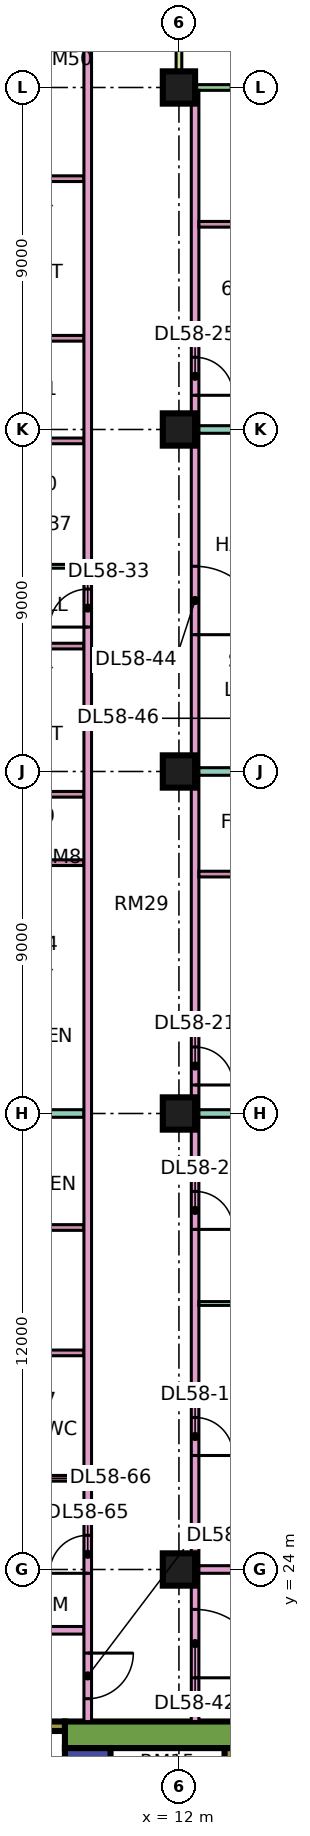
"""IFC4 building model, lengths in metres.
Left out: names, types, materials, properties, quantities, classifications, styles, units other than length and angle.
Written with IfcOpenShell. Run it as: python <this file> out.ifc"""

import sys

from ifc_helpers import new_model, si_unit, direction, frame, frame_2d, origin, origin_2d, place, context, subcontext, project, spatial, rectangle, extrude, element, fill, save


model = new_model("IFC4")
c1 = context("Model", 3, precision=1e-05, world=origin(), true_north=direction((0.0, 1.0)))
c2 = subcontext(c1, "Body", "Model", "MODEL_VIEW")
j1 = project(units=[si_unit("LENGTHUNIT", "METRE"), si_unit("PLANEANGLEUNIT", "RADIAN")], contexts=[c1])
p1 = place(None, origin())
s1 = spatial("IfcSite", under=j1, at=p1, CompositionType="ELEMENT")
p2 = place(p1, origin())
s2 = spatial("IfcBuilding", under=s1, at=p2, CompositionType="ELEMENT")
p3 = place(p2, frame((0.0, 0.0, 245.4)))
s3 = spatial("IfcBuildingStorey", under=s2, at=p3, CompositionType="ELEMENT", Elevation=245.4)
for number, where, z_axis, x_axis in (
    (1, (12.0, 24.0, 0.0), (0.0, 0.0, 1.0), (1.0, 0.0, 0.0)),
    (2, (12.0, 36.0, 0.0), (0.0, 0.0, 1.0), (1.0, 0.0, 0.0)),
    (3, (12.0, 45.0, 0.0), (0.0, 0.0, 1.0), (1.0, 0.0, 0.0)),
    (4, (12.0, 54.0, 0.0), (0.0, 0.0, 1.0), (1.0, 0.0, 0.0)),
    (5, (12.0, 63.0, 0.0), (0.0, 0.0, 1.0), (1.0, 0.0, 0.0)),
):
    element("IfcColumn", number, at=place(p3, frame(where, z_axis=z_axis, x_axis=x_axis)), inside=s3, PredefinedType="COLUMN", context=c2, shape_type="SweptSolid", body=[
        extrude(rectangle(XDim=0.85, YDim=0.85, at=origin_2d()), origin(), (0.0, 0.0, 1.0), 3.75),
    ])
p4 = place(p3, frame((9.0, 19.65, 0.0), z_axis=(0.0, 0.0, 1.0), x_axis=(1.0, 0.0, 0.0)))
e6 = element("IfcWall", 6, at=p4, inside=s3, PredefinedType="SHEAR", context=c2, shape_type="SweptSolid", body=[
    extrude(rectangle(XDim=25.0, YDim=0.7, at=frame_2d((12.5, 0.0))), origin(), (0.0, 0.0, 1.0), 3.75),
])
p5 = place(p4, frame((19.1, 0.0, 0.0)))
e7 = element("IfcOpeningElement", 7, at=p5, cuts=e6, PredefinedType="OPENING", context=c2, shape_type="SweptSolid", body=[
    extrude(rectangle(XDim=1.8, YDim=2.4, at=frame_2d((0.9, 1.2))), frame((0.0, 0.36, 0.0), z_axis=(0.0, -1.0, 0.0), x_axis=(1.0, 0.0, 0.0)), (0.0, 0.0, 1.0), 0.72),
])
p6 = place(p3, frame((9.6, 7.7, 0.0), z_axis=(0.0, 0.0, 1.0), x_axis=(0.0, 1.0, 0.0)))
e8 = element("IfcWall", 8, at=p6, inside=s3, PredefinedType="SHEAR", context=c2, shape_type="SweptSolid", body=[
    extrude(rectangle(XDim=11.6, YDim=1.2, at=frame_2d((5.8, 0.0))), origin(), (0.0, 0.0, 1.0), 3.75),
])
p7 = place(p6, frame((4.175, 0.0, 0.0)))
e9 = element("IfcOpeningElement", 9, at=p7, cuts=e8, PredefinedType="OPENING", context=c2, shape_type="SweptSolid", body=[
    extrude(rectangle(XDim=1.1, YDim=2.2, at=frame_2d((0.55, 1.1))), frame((0.0, 0.61, 0.0), z_axis=(0.0, -1.0, 0.0), x_axis=(1.0, 0.0, 0.0)), (0.0, 0.0, 1.0), 1.22),
])
p8 = place(p6, frame((6.675, 0.0, 0.0)))
e10 = element("IfcOpeningElement", 10, at=p8, cuts=e8, PredefinedType="OPENING", context=c2, shape_type="SweptSolid", body=[
    extrude(rectangle(XDim=1.1, YDim=2.2, at=frame_2d((0.55, 1.1))), frame((0.0, 0.61, 0.0), z_axis=(0.0, -1.0, 0.0), x_axis=(1.0, 0.0, 0.0)), (0.0, 0.0, 1.0), 1.22),
])
p9 = place(p6, frame((9.55, 0.0, 0.0)))
e11 = element("IfcOpeningElement", 11, at=p9, cuts=e8, PredefinedType="OPENING", context=c2, shape_type="SweptSolid", body=[
    extrude(rectangle(XDim=1.1, YDim=2.2, at=frame_2d((0.55, 1.1))), frame((0.0, 0.61, 0.0), z_axis=(0.0, -1.0, 0.0), x_axis=(1.0, 0.0, 0.0)), (0.0, 0.0, 1.0), 1.22),
])
p10 = place(p6, frame((1.85, 0.0, 0.0)))
e12 = element("IfcOpeningElement", 12, at=p10, cuts=e8, PredefinedType="OPENING", context=c2, shape_type="SweptSolid", body=[
    extrude(rectangle(XDim=0.9, YDim=2.1, at=frame_2d((0.45, 1.05))), frame((0.0, 0.61, 0.0), z_axis=(0.0, -1.0, 0.0), x_axis=(1.0, 0.0, 0.0)), (0.0, 0.0, 1.0), 1.22),
])
p11 = place(p3, frame((13.325, 7.7, 0.0), z_axis=(0.0, 0.0, 1.0), x_axis=(0.0, 1.0, 0.0)))
e13 = element("IfcWall", 13, at=p11, inside=s3, PredefinedType="SHEAR", context=c2, shape_type="SweptSolid", body=[
    extrude(rectangle(XDim=11.6, YDim=0.25, at=frame_2d((5.8, 0.0))), origin(), (0.0, 0.0, 1.0), 3.75),
])
p12 = place(p3, frame((2.1, 19.875, 0.0), z_axis=(0.0, 0.0, 1.0), x_axis=(1.0, 0.0, 0.0)))
e14 = element("IfcWall", 14, at=p12, inside=s3, PredefinedType="SHEAR", context=c2, shape_type="SweptSolid", body=[
    extrude(rectangle(XDim=6.9, YDim=0.25, at=frame_2d((3.45, 0.0))), origin(), (0.0, 0.0, 1.0), 3.75),
])
p13 = place(p12, frame((1.175, 0.0, 0.0)))
e15 = element("IfcOpeningElement", 15, at=p13, cuts=e14, PredefinedType="OPENING", context=c2, shape_type="SweptSolid", body=[
    extrude(rectangle(XDim=1.1, YDim=2.2, at=frame_2d((0.55, 1.1))), frame((0.0, 0.135, 0.0), z_axis=(0.0, -1.0, 0.0), x_axis=(1.0, 0.0, 0.0)), (0.0, 0.0, 1.0), 0.27),
])
p14 = place(p12, frame((4.6, 0.0, 0.0)))
e16 = element("IfcOpeningElement", 16, at=p14, cuts=e14, PredefinedType="OPENING", context=c2, shape_type="SweptSolid", body=[
    extrude(rectangle(XDim=1.2, YDim=2.2, at=frame_2d((0.6, 1.1))), frame((0.0, 0.135, 0.0), z_axis=(0.0, -1.0, 0.0), x_axis=(1.0, 0.0, 0.0)), (0.0, 0.0, 1.0), 0.27),
])
p15 = place(p3, frame((22.425, 63.0, 0.0), z_axis=(0.0, 0.0, 1.0), x_axis=(-1.0, 0.0, 0.0)))
e17 = element("IfcWall", 17, at=p15, inside=s3, PredefinedType="SOLIDWALL", context=c2, shape_type="SweptSolid", body=[
    extrude(rectangle(XDim=10.35, YDim=0.15, at=frame_2d((5.175, 0.0))), origin(), (0.0, 0.0, 1.0), 3.35),
])
p16 = place(p15, frame((1.7, 0.0, 0.0)))
e18 = element("IfcOpeningElement", 18, at=p16, cuts=e17, PredefinedType="OPENING", context=c2, shape_type="SweptSolid", body=[
    extrude(rectangle(XDim=1.8, YDim=2.4, at=frame_2d((0.9, 1.2))), frame((0.0, 0.085, 0.0), z_axis=(0.0, -1.0, 0.0), x_axis=(1.0, 0.0, 0.0)), (0.0, 0.0, 1.0), 0.17),
])
p17 = place(p15, frame((6.05, 0.0, 0.45)))
e19 = element("IfcOpeningElement", 19, at=p17, cuts=e17, PredefinedType="OPENING", context=c2, shape_type="SweptSolid", body=[
    extrude(rectangle(XDim=3.0, YDim=2.4, at=frame_2d((1.5, 1.2))), frame((0.0, 0.085, 0.0), z_axis=(0.0, -1.0, 0.0), x_axis=(1.0, 0.0, 0.0)), (0.0, 0.0, 1.0), 0.17),
])
p18 = place(p3, frame((12.0, 64.5, 0.0), z_axis=(0.0, 0.0, 1.0), x_axis=(0.0, -1.0, 0.0)))
e20 = element("IfcWall", 20, at=p18, inside=s3, PredefinedType="SOLIDWALL", context=c2, shape_type="SweptSolid", body=[
    extrude(rectangle(XDim=1.5, YDim=0.15, at=frame_2d((0.75, 0.0))), origin(), (0.0, 0.0, 1.0), 3.35),
])
p19 = place(p3, frame((0.074, 22.4, 0.0), z_axis=(0.0, 0.0, 1.0), x_axis=(1.0, 0.0, 0.0)))
e21 = element("IfcWall", 21, at=p19, inside=s3, PredefinedType="PARTITIONING", context=c2, shape_type="SweptSolid", body=[
    extrude(rectangle(XDim=9.426, YDim=0.2, at=frame_2d((4.713, 0.0))), origin(), (0.0, 0.0, 1.0), 3.35),
])
p20 = place(p3, frame((6.375, 26.4, 0.0), z_axis=(0.0, 0.0, 1.0), x_axis=(1.0, 0.0, 0.0)))
e22 = element("IfcWall", 22, at=p20, inside=s3, PredefinedType="PARTITIONING", context=c2, shape_type="SweptSolid", body=[
    extrude(rectangle(XDim=3.125, YDim=0.15, at=frame_2d((1.562, 0.0))), origin(), (0.0, 0.0, 1.0), 3.35),
])
p21 = place(p20, frame((1.225, 0.0, 0.0)))
e23 = element("IfcOpeningElement", 23, at=p21, cuts=e22, PredefinedType="OPENING", context=c2, shape_type="SweptSolid", body=[
    extrude(rectangle(XDim=0.8, YDim=2.1, at=frame_2d((0.4, 1.05))), frame((0.0, 0.085, 0.0), z_axis=(0.0, -1.0, 0.0), x_axis=(1.0, 0.0, 0.0)), (0.0, 0.0, 1.0), 0.17),
])
for number, where, z_axis, x_axis in (
    (24, (6.375, 29.7, 0.0), (0.0, 0.0, 1.0), (1.0, 0.0, 0.0)),
    (25, (6.375, 33.0, 0.0), (0.0, 0.0, 1.0), (1.0, 0.0, 0.0)),
):
    element("IfcWall", number, at=place(p3, frame(where, z_axis=z_axis, x_axis=x_axis)), inside=s3, PredefinedType="PARTITIONING", context=c2, shape_type="SweptSolid", body=[
        extrude(rectangle(XDim=3.125, YDim=0.15, at=frame_2d((1.562, 0.0))), origin(), (0.0, 0.0, 1.0), 3.35),
    ])
p22 = place(p3, frame((6.525, 36.0, 0.0), z_axis=(0.0, 0.0, 1.0), x_axis=(1.0, 0.0, 0.0)))
e26 = element("IfcWall", 26, at=p22, inside=s3, PredefinedType="PARTITIONING", context=c2, shape_type="SweptSolid", body=[
    extrude(rectangle(XDim=2.975, YDim=0.2, at=frame_2d((1.488, 0.0))), origin(), (0.0, 0.0, 1.0), 3.35),
])
for number, where, z_axis, x_axis in (
    (27, (6.675, 42.6, 0.0), (0.0, 0.0, 1.0), (1.0, 0.0, 0.0)),
    (28, (6.675, 44.4, 0.0), (0.0, 0.0, 1.0), (1.0, 0.0, 0.0)),
    (29, (6.675, 48.3, 0.0), (0.0, 0.0, 1.0), (1.0, 0.0, 0.0)),
):
    element("IfcWall", number, at=place(p3, frame(where, z_axis=z_axis, x_axis=x_axis)), inside=s3, PredefinedType="PARTITIONING", context=c2, shape_type="SweptSolid", body=[
        extrude(rectangle(XDim=2.825, YDim=0.15, at=frame_2d((1.413, 0.0))), origin(), (0.0, 0.0, 1.0), 3.35),
    ])
p23 = place(p3, frame((6.675, 50.4, 0.0), z_axis=(0.0, 0.0, 1.0), x_axis=(1.0, 0.0, 0.0)))
e30 = element("IfcWall", 30, at=p23, inside=s3, PredefinedType="PARTITIONING", context=c2, shape_type="SweptSolid", body=[
    extrude(rectangle(XDim=2.825, YDim=0.1, at=frame_2d((1.413, 0.0))), origin(), (0.0, 0.0, 1.0), 3.35),
])
p24 = place(p23, frame((0.975, 0.0, 0.0)))
e31 = element("IfcOpeningElement", 31, at=p24, cuts=e30, PredefinedType="OPENING", context=c2, shape_type="SweptSolid", body=[
    extrude(rectangle(XDim=0.9, YDim=2.1, at=frame_2d((0.45, 1.05))), frame((0.0, 0.06, 0.0), z_axis=(0.0, -1.0, 0.0), x_axis=(1.0, 0.0, 0.0)), (0.0, 0.0, 1.0), 0.12),
])
for number, where, z_axis, x_axis in (
    (32, (6.675, 53.7, 0.0), (0.0, 0.0, 1.0), (1.0, 0.0, 0.0)),
    (33, (6.675, 56.4, 0.0), (0.0, 0.0, 1.0), (1.0, 0.0, 0.0)),
    (34, (6.675, 60.6, 0.0), (0.0, 0.0, 1.0), (1.0, 0.0, 0.0)),
):
    element("IfcWall", number, at=place(p3, frame(where, z_axis=z_axis, x_axis=x_axis)), inside=s3, PredefinedType="PARTITIONING", context=c2, shape_type="SweptSolid", body=[
        extrude(rectangle(XDim=2.825, YDim=0.15, at=frame_2d((1.413, 0.0))), origin(), (0.0, 0.0, 1.0), 3.35),
    ])
p25 = place(p3, frame((9.6, 20.0, 0.0), z_axis=(0.0, 0.0, 1.0), x_axis=(0.0, 1.0, 0.0)))
e35 = element("IfcWall", 35, at=p25, inside=s3, PredefinedType="PARTITIONING", context=c2, shape_type="SweptSolid", body=[
    extrude(rectangle(XDim=44.35, YDim=0.2, at=frame_2d((22.175, 0.0))), origin(), (0.0, 0.0, 1.0), 3.35),
])
p26 = place(p25, frame((28.8, 0.0, 0.0)))
e36 = element("IfcOpeningElement", 36, at=p26, cuts=e35, PredefinedType="OPENING", context=c2, shape_type="SweptSolid", body=[
    extrude(rectangle(XDim=1.0, YDim=2.1, at=frame_2d((0.5, 1.05))), frame((0.0, 0.11, 0.0), z_axis=(0.0, -1.0, 0.0), x_axis=(1.0, 0.0, 0.0)), (0.0, 0.0, 1.0), 0.22),
])
p27 = place(p25, frame((0.6, 0.0, 0.0)))
e37 = element("IfcOpeningElement", 37, at=p27, cuts=e35, PredefinedType="OPENING", context=c2, shape_type="SweptSolid", body=[
    extrude(rectangle(XDim=1.2, YDim=2.1, at=frame_2d((0.6, 1.05))), frame((0.0, 0.11, 0.0), z_axis=(0.0, -1.0, 0.0), x_axis=(1.0, 0.0, 0.0)), (0.0, 0.0, 1.0), 0.22),
])
p28 = place(p25, frame((3.9, 0.0, 0.0)))
e38 = element("IfcOpeningElement", 38, at=p28, cuts=e35, PredefinedType="OPENING", context=c2, shape_type="SweptSolid", body=[
    extrude(rectangle(XDim=1.0, YDim=2.1, at=frame_2d((0.5, 1.05))), frame((0.0, 0.11, 0.0), z_axis=(0.0, -1.0, 0.0), x_axis=(1.0, 0.0, 0.0)), (0.0, 0.0, 1.0), 0.22),
])
p29 = place(p3, frame((12.425, 20.0, 0.0), z_axis=(0.0, 0.0, 1.0), x_axis=(0.0, 1.0, 0.0)))
e39 = element("IfcWall", 39, at=p29, inside=s3, PredefinedType="PARTITIONING", context=c2, shape_type="SweptSolid", body=[
    extrude(rectangle(XDim=42.926, YDim=0.2, at=frame_2d((21.463, 0.0))), origin(), (0.0, 0.0, 1.0), 3.35),
])
p30 = place(p29, frame((7.0, 0.0, 0.0)))
e40 = element("IfcOpeningElement", 40, at=p30, cuts=e39, PredefinedType="OPENING", context=c2, shape_type="SweptSolid", body=[
    extrude(rectangle(XDim=1.0, YDim=2.1, at=frame_2d((0.5, 1.05))), frame((0.0, 0.11, 0.0), z_axis=(0.0, -1.0, 0.0), x_axis=(1.0, 0.0, 0.0)), (0.0, 0.0, 1.0), 0.22),
])
p31 = place(p29, frame((12.95, 0.0, 0.0)))
e41 = element("IfcOpeningElement", 41, at=p31, cuts=e39, PredefinedType="OPENING", context=c2, shape_type="SweptSolid", body=[
    extrude(rectangle(XDim=1.0, YDim=2.1, at=frame_2d((0.5, 1.05))), frame((0.0, 0.11, 0.0), z_axis=(0.0, -1.0, 0.0), x_axis=(1.0, 0.0, 0.0)), (0.0, 0.0, 1.0), 0.22),
])
p32 = place(p29, frame((16.75, 0.0, 0.0)))
e42 = element("IfcOpeningElement", 42, at=p32, cuts=e39, PredefinedType="OPENING", context=c2, shape_type="SweptSolid", body=[
    extrude(rectangle(XDim=1.0, YDim=2.1, at=frame_2d((0.5, 1.05))), frame((0.0, 0.11, 0.0), z_axis=(0.0, -1.0, 0.0), x_axis=(1.0, 0.0, 0.0)), (0.0, 0.0, 1.0), 0.22),
])
p33 = place(p29, frame((34.9, 0.0, 0.0)))
e43 = element("IfcOpeningElement", 43, at=p33, cuts=e39, PredefinedType="OPENING", context=c2, shape_type="SweptSolid", body=[
    extrude(rectangle(XDim=1.0, YDim=2.1, at=frame_2d((0.5, 1.05))), frame((0.0, 0.11, 0.0), z_axis=(0.0, -1.0, 0.0), x_axis=(1.0, 0.0, 0.0)), (0.0, 0.0, 1.0), 0.22),
])
p34 = place(p29, frame((1.15, 0.0, 0.0)))
e44 = element("IfcOpeningElement", 44, at=p34, cuts=e39, PredefinedType="OPENING", context=c2, shape_type="SweptSolid", body=[
    extrude(rectangle(XDim=1.8, YDim=2.1, at=frame_2d((0.9, 1.05))), frame((0.0, 0.11, 0.0), z_axis=(0.0, -1.0, 0.0), x_axis=(1.0, 0.0, 0.0)), (0.0, 0.0, 1.0), 0.22),
])
p35 = place(p29, frame((28.6, 0.0, 0.0)))
e45 = element("IfcOpeningElement", 45, at=p35, cuts=e39, PredefinedType="OPENING", context=c2, shape_type="SweptSolid", body=[
    extrude(rectangle(XDim=1.8, YDim=2.1, at=frame_2d((0.9, 1.05))), frame((0.0, 0.11, 0.0), z_axis=(0.0, -1.0, 0.0), x_axis=(1.0, 0.0, 0.0)), (0.0, 0.0, 1.0), 0.22),
])
p36 = place(p3, frame((12.525, 24.0, 0.0), z_axis=(0.0, 0.0, 1.0), x_axis=(1.0, 0.0, 0.0)))
e46 = element("IfcWall", 46, at=p36, inside=s3, PredefinedType="PARTITIONING", context=c2, shape_type="SweptSolid", body=[
    extrude(rectangle(XDim=8.975, YDim=0.2, at=frame_2d((4.488, 0.0))), origin(), (0.0, 0.0, 1.0), 3.35),
])
p37 = place(p3, frame((12.525, 31.0, 0.0), z_axis=(0.0, 0.0, 1.0), x_axis=(1.0, 0.0, 0.0)))
e47 = element("IfcWall", 47, at=p37, inside=s3, PredefinedType="PARTITIONING", context=c2, shape_type="SweptSolid", body=[
    extrude(rectangle(XDim=8.975, YDim=0.1, at=frame_2d((4.488, 0.0))), origin(), (0.0, 0.0, 1.0), 3.35),
])
p38 = place(p3, frame((12.525, 36.0, 0.0), z_axis=(0.0, 0.0, 1.0), x_axis=(1.0, 0.0, 0.0)))
e48 = element("IfcWall", 48, at=p38, inside=s3, PredefinedType="PARTITIONING", context=c2, shape_type="SweptSolid", body=[
    extrude(rectangle(XDim=11.475, YDim=0.2, at=frame_2d((5.738, 0.0))), origin(), (0.0, 0.0, 1.0), 3.35),
])
for number, where, z_axis, x_axis in (
    (49, (12.525, 38.4, 0.0), (0.0, 0.0, 1.0), (1.0, 0.0, 0.0)),
    (50, (12.525, 42.3, 0.0), (0.0, 0.0, 1.0), (1.0, 0.0, 0.0)),
):
    element("IfcWall", number, at=place(p3, frame(where, z_axis=z_axis, x_axis=x_axis)), inside=s3, PredefinedType="PARTITIONING", context=c2, shape_type="SweptSolid", body=[
        extrude(rectangle(XDim=5.225, YDim=0.15, at=frame_2d((2.613, 0.0))), origin(), (0.0, 0.0, 1.0), 3.35),
    ])
p39 = place(p3, frame((12.525, 45.0, 0.0), z_axis=(0.0, 0.0, 1.0), x_axis=(1.0, 0.0, 0.0)))
e51 = element("IfcWall", 51, at=p39, inside=s3, PredefinedType="PARTITIONING", context=c2, shape_type="SweptSolid", body=[
    extrude(rectangle(XDim=11.401, YDim=0.2, at=frame_2d((5.701, 0.0))), origin(), (0.0, 0.0, 1.0), 3.35),
])
p40 = place(p3, frame((12.525, 54.0, 0.0), z_axis=(0.0, 0.0, 1.0), x_axis=(1.0, 0.0, 0.0)))
e52 = element("IfcWall", 52, at=p40, inside=s3, PredefinedType="PARTITIONING", context=c2, shape_type="SweptSolid", body=[
    extrude(rectangle(XDim=11.475, YDim=0.2, at=frame_2d((5.738, 0.0))), origin(), (0.0, 0.0, 1.0), 3.35),
])
for number, where, z_axis, x_axis in (
    (53, (12.525, 56.7, 0.0), (0.0, 0.0, 1.0), (1.0, 0.0, 0.0)),
    (54, (12.525, 59.4, 0.0), (0.0, 0.0, 1.0), (1.0, 0.0, 0.0)),
):
    element("IfcWall", number, at=place(p3, frame(where, z_axis=z_axis, x_axis=x_axis)), inside=s3, PredefinedType="PARTITIONING", context=c2, shape_type="SweptSolid", body=[
        extrude(rectangle(XDim=4.625, YDim=0.15, at=frame_2d((2.312, 0.0))), origin(), (0.0, 0.0, 1.0), 3.35),
    ])
p41 = place(p30, frame((1.0, 0.0, 0.0), z_axis=(0.0, 0.0, 1.0), x_axis=(-1.0, 0.0, 0.0)))
e55 = element("IfcDoor", 55, at=p41, inside=s3, OperationType="SINGLE_SWING_LEFT", PredefinedType="DOOR", context=c2, shape_type="SweptSolid", body=[
    extrude(rectangle(XDim=1.0, YDim=2.1, at=frame_2d((0.5, 1.05))), frame((0.0, 0.025, 0.0), z_axis=(0.0, -1.0, 0.0), x_axis=(1.0, 0.0, 0.0)), (0.0, 0.0, 1.0), 0.05),
])
fill(e40, e55)
p42 = place(p31, frame((1.0, 0.0, 0.0), z_axis=(0.0, 0.0, 1.0), x_axis=(-1.0, 0.0, 0.0)))
e56 = element("IfcDoor", 56, at=p42, inside=s3, OperationType="SINGLE_SWING_LEFT", PredefinedType="DOOR", context=c2, shape_type="SweptSolid", body=[
    extrude(rectangle(XDim=1.0, YDim=2.1, at=frame_2d((0.5, 1.05))), frame((0.0, 0.025, 0.0), z_axis=(0.0, -1.0, 0.0), x_axis=(1.0, 0.0, 0.0)), (0.0, 0.0, 1.0), 0.05),
])
fill(e41, e56)
p43 = place(p32, frame((1.0, 0.0, 0.0), z_axis=(0.0, 0.0, 1.0), x_axis=(-1.0, 0.0, 0.0)))
e57 = element("IfcDoor", 57, at=p43, inside=s3, OperationType="SINGLE_SWING_LEFT", PredefinedType="DOOR", context=c2, shape_type="SweptSolid", body=[
    extrude(rectangle(XDim=1.0, YDim=2.1, at=frame_2d((0.5, 1.05))), frame((0.0, 0.025, 0.0), z_axis=(0.0, -1.0, 0.0), x_axis=(1.0, 0.0, 0.0)), (0.0, 0.0, 1.0), 0.05),
])
fill(e42, e57)
p44 = place(p33, frame((1.0, 0.0, 0.0), z_axis=(0.0, 0.0, 1.0), x_axis=(-1.0, 0.0, 0.0)))
e58 = element("IfcDoor", 58, at=p44, inside=s3, OperationType="SINGLE_SWING_LEFT", PredefinedType="DOOR", context=c2, shape_type="SweptSolid", body=[
    extrude(rectangle(XDim=1.0, YDim=2.1, at=frame_2d((0.5, 1.05))), frame((0.0, 0.025, 0.0), z_axis=(0.0, -1.0, 0.0), x_axis=(1.0, 0.0, 0.0)), (0.0, 0.0, 1.0), 0.05),
])
fill(e43, e58)
p45 = place(p26, origin())
e59 = element("IfcDoor", 59, at=p45, inside=s3, OperationType="SINGLE_SWING_LEFT", PredefinedType="DOOR", context=c2, shape_type="SweptSolid", body=[
    extrude(rectangle(XDim=1.0, YDim=2.1, at=frame_2d((0.5, 1.05))), frame((0.0, 0.025, 0.0), z_axis=(0.0, -1.0, 0.0), x_axis=(1.0, 0.0, 0.0)), (0.0, 0.0, 1.0), 0.05),
])
fill(e36, e59)
p46 = place(p34, frame((1.8, 0.0, 0.0), z_axis=(0.0, 0.0, 1.0), x_axis=(-1.0, 0.0, 0.0)))
e60 = element("IfcDoor", 60, at=p46, inside=s3, OperationType="DOUBLE_DOOR_SINGLE_SWING", PredefinedType="DOOR", context=c2, shape_type="SweptSolid", body=[
    extrude(rectangle(XDim=1.8, YDim=2.1, at=frame_2d((0.9, 1.05))), frame((0.0, 0.025, 0.0), z_axis=(0.0, -1.0, 0.0), x_axis=(1.0, 0.0, 0.0)), (0.0, 0.0, 1.0), 0.05),
])
fill(e44, e60)
p47 = place(p27, origin())
e61 = element("IfcDoor", 61, at=p47, inside=s3, OperationType="SINGLE_SWING_RIGHT", PredefinedType="DOOR", context=c2, shape_type="SweptSolid", body=[
    extrude(rectangle(XDim=1.2, YDim=2.1, at=frame_2d((0.6, 1.05))), frame((0.0, 0.025, 0.0), z_axis=(0.0, -1.0, 0.0), x_axis=(1.0, 0.0, 0.0)), (0.0, 0.0, 1.0), 0.05),
])
fill(e37, e61)
p48 = place(p35, frame((1.8, 0.0, 0.0), z_axis=(0.0, 0.0, 1.0), x_axis=(-1.0, 0.0, 0.0)))
e62 = element("IfcDoor", 62, at=p48, inside=s3, OperationType="DOUBLE_DOOR_SINGLE_SWING", PredefinedType="DOOR", context=c2, shape_type="SweptSolid", body=[
    extrude(rectangle(XDim=1.8, YDim=2.1, at=frame_2d((0.9, 1.05))), frame((0.0, 0.025, 0.0), z_axis=(0.0, -1.0, 0.0), x_axis=(1.0, 0.0, 0.0)), (0.0, 0.0, 1.0), 0.05),
])
fill(e45, e62)
p49 = place(p28, origin())
e63 = element("IfcDoor", 63, at=p49, inside=s3, OperationType="SINGLE_SWING_LEFT", PredefinedType="DOOR", context=c2, shape_type="SweptSolid", body=[
    extrude(rectangle(XDim=1.0, YDim=2.1, at=frame_2d((0.5, 1.05))), frame((0.0, 0.025, 0.0), z_axis=(0.0, -1.0, 0.0), x_axis=(1.0, 0.0, 0.0)), (0.0, 0.0, 1.0), 0.05),
])
fill(e38, e63)
save(model, sys.argv[1])
